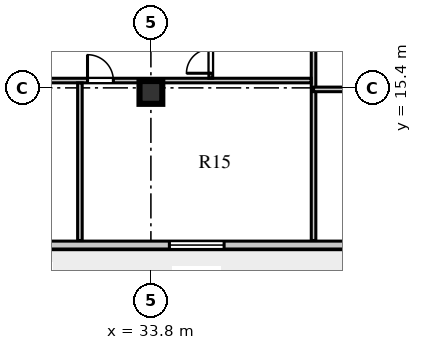
"""IFC4 building model, lengths in metres.
Left out: names, types, materials, properties, quantities, classifications, styles, units other than length and angle.
Written with IfcOpenShell. Run it as: python <this file> out.ifc"""

import sys

from ifc_helpers import new_model, si_unit, direction, frame, frame_2d, origin, origin_2d, place, context, subcontext, project, spatial, rectangle, extrude, element, fill, save


model = new_model("IFC4")
c1 = context("Model", 3, precision=1e-05, world=origin(), true_north=direction((0.0, 1.0)))
c2 = subcontext(c1, "Body", "Model", "MODEL_VIEW")
j1 = project(units=[si_unit("LENGTHUNIT", "METRE"), si_unit("PLANEANGLEUNIT", "RADIAN")], contexts=[c1])
p1 = place(None, origin())
s1 = spatial("IfcSite", under=j1, at=p1, CompositionType="ELEMENT")
p2 = place(p1, origin())
s2 = spatial("IfcBuilding", under=s1, at=p2, CompositionType="ELEMENT")
p3 = place(p2, frame((0.0, 0.0, 320.1)))
s3 = spatial("IfcBuildingStorey", under=s2, at=p3, CompositionType="ELEMENT", Elevation=320.1)
p4 = place(p3, frame((33.8, 15.25, 0.0), z_axis=(0.0, 0.0, 1.0), x_axis=(1.0, 0.0, 0.0)))
e1 = element("IfcColumn", 1, at=p4, inside=s3, PredefinedType="COLUMN", context=c2, shape_type="SweptSolid", body=[
    extrude(rectangle(XDim=0.75, YDim=0.75, at=origin_2d()), origin(), (0.0, 0.0, 1.0), 3.56),
])
p5 = place(p3, frame((13.45, 10.23, 0.0), z_axis=(0.0, 0.0, 1.0), x_axis=(1.0, 0.0, 0.0)))
e2 = element("IfcWall", 2, at=p5, inside=s3, PredefinedType="SOLIDWALL", context=c2, shape_type="SweptSolid", body=[
    extrude(rectangle(XDim=31.7, YDim=0.26, at=frame_2d((15.85, 0.0))), origin(), (0.0, 0.0, 1.0), 3.56),
])
p6 = place(p5, frame((0.95, 0.0, 0.0)))
e3 = element("IfcOpeningElement", 3, at=p6, cuts=e2, PredefinedType="OPENING", context=c2, shape_type="SweptSolid", body=[
    extrude(rectangle(XDim=1.0, YDim=2.05, at=frame_2d((0.5, 1.025))), frame((0.0, 0.14, 0.0), z_axis=(0.0, -1.0, 0.0), x_axis=(1.0, 0.0, 0.0)), (0.0, 0.0, 1.0), 0.28),
])
p7 = place(p5, frame((5.86, 0.0, 0.8)))
e4 = element("IfcOpeningElement", 4, at=p7, cuts=e2, PredefinedType="OPENING", context=c2, shape_type="SweptSolid", body=[
    extrude(rectangle(XDim=1.95, YDim=2.0, at=frame_2d((0.975, 1.0))), frame((0.0, 0.14, 0.0), z_axis=(0.0, -1.0, 0.0), x_axis=(1.0, 0.0, 0.0)), (0.0, 0.0, 1.0), 0.28),
])
p8 = place(p5, frame((14.698, 0.0, 0.8)))
e5 = element("IfcOpeningElement", 5, at=p8, cuts=e2, PredefinedType="OPENING", context=c2, shape_type="SweptSolid", body=[
    extrude(rectangle(XDim=2.25, YDim=2.0, at=frame_2d((1.125, 1.0))), frame((0.0, 0.14, 0.0), z_axis=(0.0, -1.0, 0.0), x_axis=(1.0, 0.0, 0.0)), (0.0, 0.0, 1.0), 0.28),
])
p9 = place(p5, frame((20.958, 0.0, 0.8)))
e6 = element("IfcOpeningElement", 6, at=p9, cuts=e2, PredefinedType="OPENING", context=c2, shape_type="SweptSolid", body=[
    extrude(rectangle(XDim=1.8, YDim=2.0, at=frame_2d((0.9, 1.0))), frame((0.0, 0.14, 0.0), z_axis=(0.0, -1.0, 0.0), x_axis=(1.0, 0.0, 0.0)), (0.0, 0.0, 1.0), 0.28),
])
p10 = place(p5, frame((27.895, 0.0, 0.8)))
e7 = element("IfcOpeningElement", 7, at=p10, cuts=e2, PredefinedType="OPENING", context=c2, shape_type="SweptSolid", body=[
    extrude(rectangle(XDim=1.5, YDim=2.0, at=frame_2d((0.75, 1.0))), frame((0.0, 0.14, 0.0), z_axis=(0.0, -1.0, 0.0), x_axis=(1.0, 0.0, 0.0)), (0.0, 0.0, 1.0), 0.28),
])
p11 = place(p3, frame((39.15, 10.38, 0.0), z_axis=(0.0, 0.0, 1.0), x_axis=(0.0, 1.0, 0.0)))
e8 = element("IfcWall", 8, at=p11, inside=s3, PredefinedType="PARTITIONING", context=c2, shape_type="SweptSolid", body=[
    extrude(rectangle(XDim=11.04, YDim=0.15, at=frame_2d((5.52, 0.0))), origin(), (0.0, 0.0, 1.0), 3.56),
])
p12 = place(p3, frame((27.24, 15.641, 0.0), z_axis=(0.0, 0.0, 1.0), x_axis=(1.0, 0.0, 0.0)))
e9 = element("IfcWall", 9, at=p12, inside=s3, PredefinedType="PARTITIONING", context=c2, shape_type="SweptSolid", body=[
    extrude(rectangle(XDim=11.83, YDim=0.15, at=frame_2d((5.915, 0.0))), origin(), (0.0, 0.0, 1.0), 3.56),
])
p13 = place(p12, frame((0.3, 0.0, 0.0)))
e10 = element("IfcOpeningElement", 10, at=p13, cuts=e9, PredefinedType="OPENING", context=c2, shape_type="SweptSolid", body=[
    extrude(rectangle(XDim=0.85, YDim=2.08, at=frame_2d((0.425, 1.04))), frame((0.0, 0.085, 0.0), z_axis=(0.0, -1.0, 0.0), x_axis=(1.0, 0.0, 0.0)), (0.0, 0.0, 1.0), 0.17),
])
p14 = place(p12, frame((4.475, 0.0, 0.0)))
e11 = element("IfcOpeningElement", 11, at=p14, cuts=e9, PredefinedType="OPENING", context=c2, shape_type="SweptSolid", body=[
    extrude(rectangle(XDim=0.85, YDim=2.08, at=frame_2d((0.425, 1.04))), frame((0.0, 0.085, 0.0), z_axis=(0.0, -1.0, 0.0), x_axis=(1.0, 0.0, 0.0)), (0.0, 0.0, 1.0), 0.17),
])
p15 = place(p3, frame((35.77, 15.721, 0.0), z_axis=(0.0, 0.0, 1.0), x_axis=(0.0, 1.0, 0.0)))
e12 = element("IfcWall", 12, at=p15, inside=s3, PredefinedType="PLUMBINGWALL", context=c2, shape_type="SweptSolid", body=[
    extrude(rectangle(XDim=5.619, YDim=0.125, at=frame_2d((2.81, 0.0))), origin(), (0.0, 0.0, 1.0), 3.56),
])
p16 = place(p15, frame((0.16, 0.0, 0.0)))
e13 = element("IfcOpeningElement", 13, at=p16, cuts=e12, PredefinedType="OPENING", context=c2, shape_type="SweptSolid", body=[
    extrude(rectangle(XDim=0.8, YDim=2.05, at=frame_2d((0.4, 1.025))), frame((0.0, 0.073, 0.0), z_axis=(0.0, -1.0, 0.0), x_axis=(1.0, 0.0, 0.0)), (0.0, 0.0, 1.0), 0.145),
])
p17 = place(p15, frame((2.977, 0.0, 0.0)))
e14 = element("IfcOpeningElement", 14, at=p17, cuts=e12, PredefinedType="OPENING", context=c2, shape_type="SweptSolid", body=[
    extrude(rectangle(XDim=0.85, YDim=2.08, at=frame_2d((0.425, 1.04))), frame((0.0, 0.073, 0.0), z_axis=(0.0, -1.0, 0.0), x_axis=(1.0, 0.0, 0.0)), (0.0, 0.0, 1.0), 0.145),
])
p18 = place(p3, frame((31.465, 10.38, 0.0), z_axis=(0.0, 0.0, 1.0), x_axis=(0.0, 1.0, 0.0)))
e15 = element("IfcWall", 15, at=p18, inside=s3, PredefinedType="PARTITIONING", context=c2, shape_type="SweptSolid", body=[
    extrude(rectangle(XDim=5.181, YDim=0.15, at=frame_2d((2.591, 0.0))), origin(), (0.0, 0.0, 1.0), 3.56),
])
p19 = place(p3, frame((39.15, 15.35, 0.0), z_axis=(0.0, 0.0, 1.0), x_axis=(1.0, 0.0, 0.0)))
e16 = element("IfcWall", 16, at=p19, inside=s3, PredefinedType="PARTITIONING", context=c2, shape_type="SweptSolid", body=[
    extrude(rectangle(XDim=8.77, YDim=0.15, at=frame_2d((4.385, 0.0))), origin(), (0.0, 0.0, 1.0), 2.96),
])
p20 = place(p9, origin())
e17 = element("IfcWindow", 17, at=p20, inside=s3, PartitioningType="SINGLE_PANEL", PredefinedType="WINDOW", context=c2, shape_type="SweptSolid", body=[
    extrude(rectangle(XDim=1.8, YDim=2.0, at=frame_2d((0.9, 1.0))), frame((0.0, 0.03, 0.0), z_axis=(0.0, -1.0, 0.0), x_axis=(1.0, 0.0, 0.0)), (0.0, 0.0, 1.0), 0.06),
])
fill(e6, e17)
p21 = place(p16, origin())
e18 = element("IfcDoor", 18, at=p21, inside=s3, OperationType="SINGLE_SWING_LEFT", PredefinedType="DOOR", context=c2, shape_type="SweptSolid", body=[
    extrude(rectangle(XDim=0.8, YDim=2.05, at=frame_2d((0.4, 1.025))), frame((0.0, 0.025, 0.0), z_axis=(0.0, -1.0, 0.0), x_axis=(1.0, 0.0, 0.0)), (0.0, 0.0, 1.0), 0.05),
])
fill(e13, e18)
p22 = place(p14, frame((0.85, 0.0, 0.0), z_axis=(0.0, 0.0, 1.0), x_axis=(-1.0, 0.0, 0.0)))
e19 = element("IfcDoor", 19, at=p22, inside=s3, OperationType="SINGLE_SWING_RIGHT", PredefinedType="DOOR", context=c2, shape_type="SweptSolid", body=[
    extrude(rectangle(XDim=0.85, YDim=2.08, at=frame_2d((0.425, 1.04))), frame((0.0, 0.025, 0.0), z_axis=(0.0, -1.0, 0.0), x_axis=(1.0, 0.0, 0.0)), (0.0, 0.0, 1.0), 0.05),
])
fill(e11, e19)
save(model, sys.argv[1])
